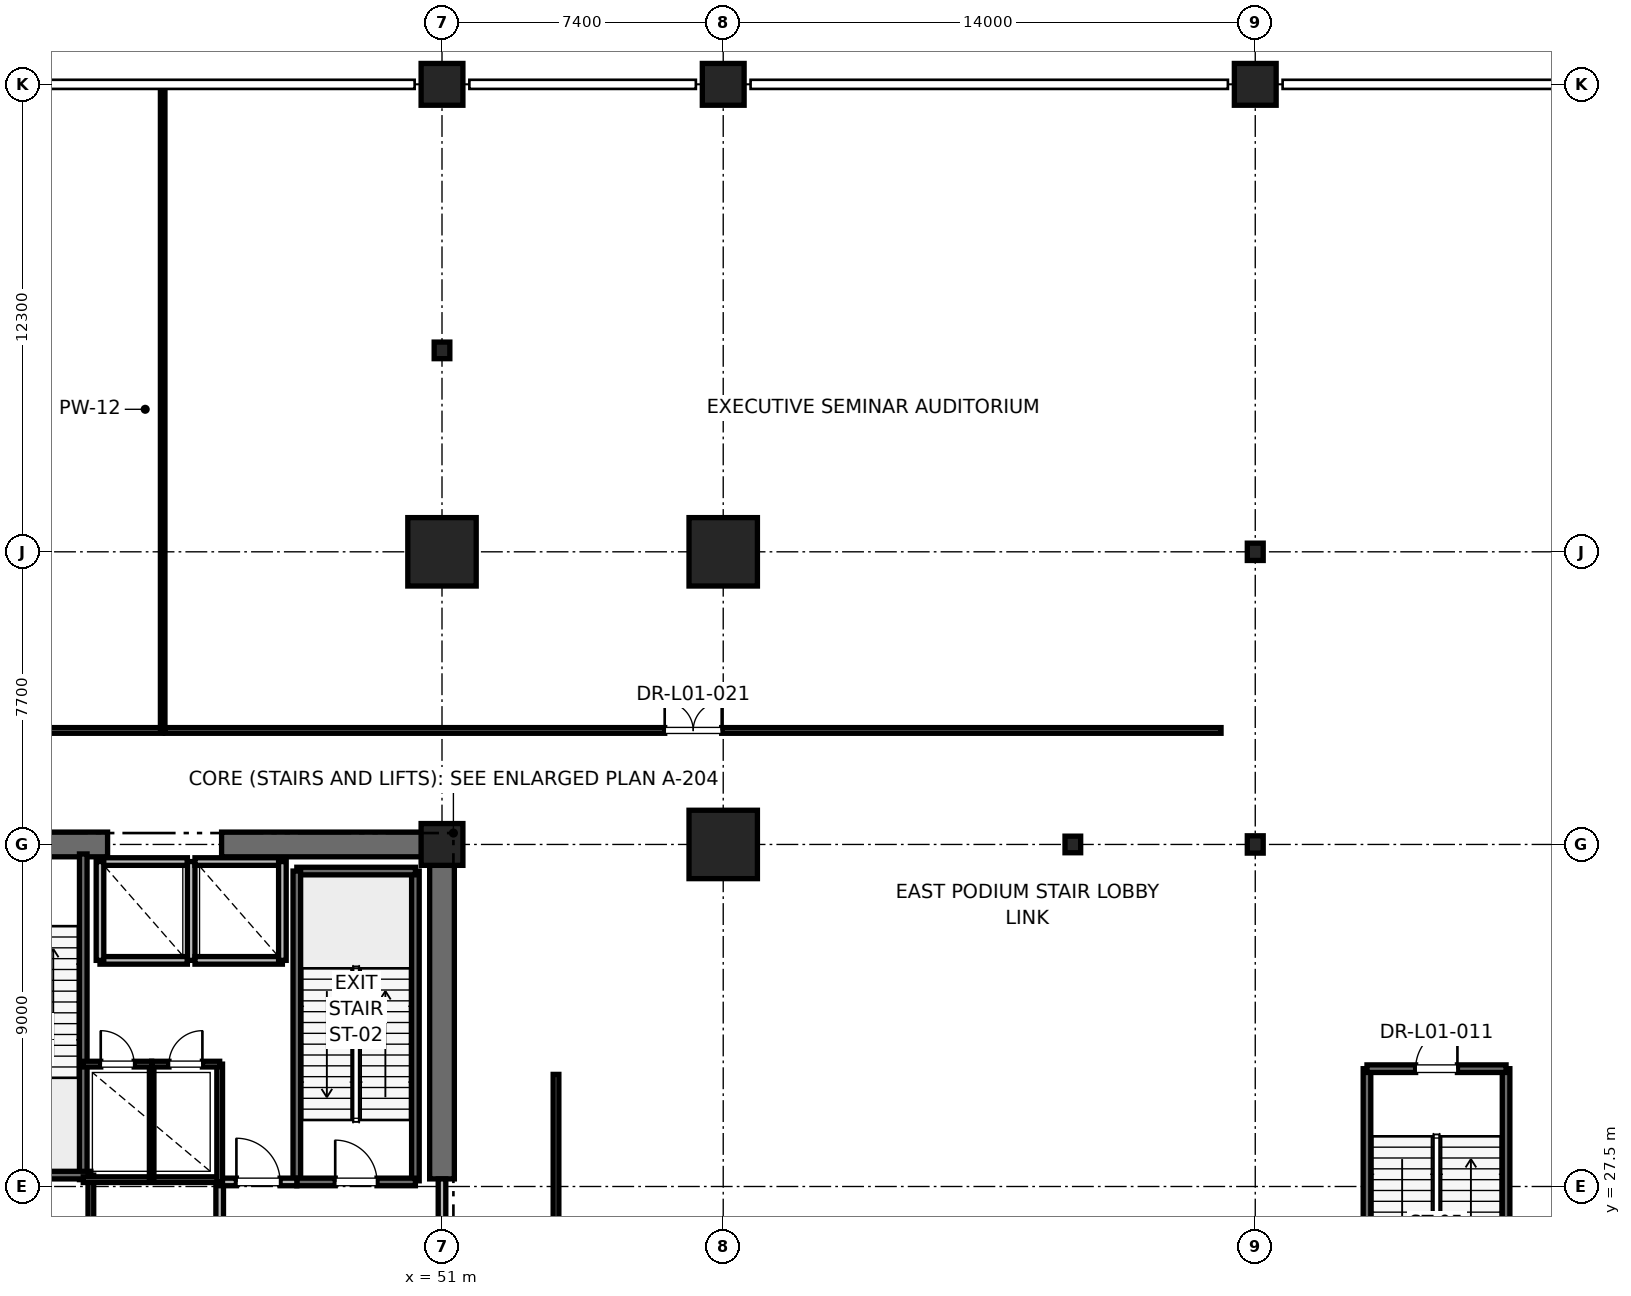
"""IFC4 building model, lengths in metres.
Left out: names, types, materials, properties, quantities, classifications, styles, units other than length and angle.
Written with IfcOpenShell. Run it as: python <this file> out.ifc"""

import sys

from ifc_helpers import new_model, si_unit, direction, frame, frame_2d, origin, origin_2d, place, context, subcontext, project, spatial, rectangle, i_section, extrude, element, fill, save


model = new_model("IFC4")
c1 = context("Model", 3, precision=1e-05, world=origin(), true_north=direction((0.0, 1.0)))
c2 = subcontext(c1, "Body", "Model", "MODEL_VIEW")
j1 = project(units=[si_unit("LENGTHUNIT", "METRE"), si_unit("PLANEANGLEUNIT", "RADIAN")], contexts=[c1])
p1 = place(None, origin())
s1 = spatial("IfcSite", under=j1, at=p1, CompositionType="ELEMENT")
p2 = place(p1, origin())
s2 = spatial("IfcBuilding", under=s1, at=p2, CompositionType="ELEMENT")
p3 = place(p2, frame((0.0, 0.0, 6.0)))
s3 = spatial("IfcBuildingStorey", under=s2, at=p3, CompositionType="ELEMENT", Elevation=6.0)
for number, where, z_axis, x_axis in (
    (1, (51.0, 44.2, 0.0), (0.0, 0.0, 1.0), (1.0, 0.0, 0.0)),
    (2, (58.4, 36.5, 0.0), (0.0, 0.0, 1.0), (1.0, 0.0, 0.0)),
    (3, (58.4, 44.2, 0.0), (0.0, 0.0, 1.0), (1.0, 0.0, 0.0)),
):
    element("IfcColumn", number, at=place(p3, frame(where, z_axis=z_axis, x_axis=x_axis)), inside=s3, PredefinedType="COLUMN", context=c2, shape_type="SweptSolid", body=[
        extrude(rectangle(XDim=1.8, YDim=1.8, at=origin_2d()), origin(), (0.0, 0.0, 1.0), 5.2),
    ])
for number, where, z_axis, x_axis in (
    (4, (67.6, 36.5, 0.0), (0.0, 0.0, 1.0), (1.0, 0.0, 0.0)),
    (5, (51.0, 49.5, 0.0), (0.0, 0.0, 1.0), (1.0, 0.0, 0.0)),
):
    element("IfcColumn", number, at=place(p3, frame(where, z_axis=z_axis, x_axis=x_axis)), inside=s3, PredefinedType="COLUMN", context=c2, shape_type="SweptSolid", body=[
        extrude(i_section(OverallWidth=0.412, OverallDepth=0.437, WebThickness=0.036, FlangeThickness=0.058, FilletRadius=0.015, at=origin_2d()), origin(), (0.0, 0.0, 1.0), 5.2),
    ])
p4 = place(p3, frame((51.0, 36.5, 0.0), z_axis=(0.0, 0.0, 1.0), x_axis=(1.0, 0.0, 0.0)))
e6 = element("IfcColumn", 6, at=p4, inside=s3, PredefinedType="PILASTER", context=c2, shape_type="SweptSolid", body=[
    extrude(rectangle(XDim=1.1, YDim=1.1, at=origin_2d()), origin(), (0.0, 0.0, 1.0), 5.2),
])
for number, where, z_axis, x_axis in (
    (7, (51.0, 56.5, 0.0), (0.0, 0.0, 1.0), (1.0, 0.0, 0.0)),
    (8, (58.4, 56.5, 0.0), (0.0, 0.0, 1.0), (1.0, 0.0, 0.0)),
    (9, (72.4, 56.5, 0.0), (0.0, 0.0, 1.0), (1.0, 0.0, 0.0)),
):
    element("IfcColumn", number, at=place(p3, frame(where, z_axis=z_axis, x_axis=x_axis)), inside=s3, PredefinedType="COLUMN", context=c2, shape_type="SweptSolid", body=[
        extrude(rectangle(XDim=1.1, YDim=1.1, at=origin_2d()), origin(), (0.0, 0.0, 1.0), 5.2),
    ])
for number, where, z_axis, x_axis in (
    (10, (72.4, 36.5, 0.0), (0.0, 0.0, 1.0), (1.0, 0.0, 0.0)),
    (11, (72.4, 44.2, 0.0), (0.0, 0.0, 1.0), (1.0, 0.0, 0.0)),
):
    element("IfcColumn", number, at=place(p3, frame(where, z_axis=z_axis, x_axis=x_axis)), inside=s3, PredefinedType="COLUMN", context=c2, shape_type="SweptSolid", body=[
        extrude(i_section(OverallWidth=0.418, OverallDepth=0.456, WebThickness=0.042, FlangeThickness=0.067, FilletRadius=0.015, at=origin_2d()), origin(), (0.0, 0.0, 1.0), 5.2),
    ])
p5 = place(p3, frame((37.8, 36.5, 0.0), z_axis=(0.0, 0.0, 1.0), x_axis=(1.0, 0.0, 0.0)))
e12 = element("IfcWall", 12, at=p5, inside=s3, PredefinedType="SHEAR", context=c2, shape_type="SweptSolid", body=[
    extrude(rectangle(XDim=4.4, YDim=0.65, at=frame_2d((2.2, 0.0))), origin(), (0.0, 0.0, 1.0), 4.92),
])
p6 = place(p5, frame((1.65, 0.0, 0.0)))
e13 = element("IfcOpeningElement", 13, at=p6, cuts=e12, PredefinedType="OPENING", context=c2, shape_type="SweptSolid", body=[
    extrude(rectangle(XDim=1.1, YDim=2.15, at=frame_2d((0.55, 1.075))), frame((0.0, 0.325, 0.0), z_axis=(0.0, -1.0, 0.0), x_axis=(1.0, 0.0, 0.0)), (0.0, 0.0, 1.0), 0.65),
])
p7 = place(p3, frame((45.2, 36.5, 0.0), z_axis=(0.0, 0.0, 1.0), x_axis=(1.0, 0.0, 0.0)))
e14 = element("IfcWall", 14, at=p7, inside=s3, PredefinedType="SHEAR", context=c2, shape_type="SweptSolid", body=[
    extrude(rectangle(XDim=5.8, YDim=0.65, at=frame_2d((2.9, 0.0))), origin(), (0.0, 0.0, 1.0), 4.92),
])
p8 = place(p3, frame((51.0, 27.7, 0.0), z_axis=(0.0, 0.0, 1.0), x_axis=(0.0, 1.0, 0.0)))
e15 = element("IfcWall", 15, at=p8, inside=s3, PredefinedType="SHEAR", context=c2, shape_type="SweptSolid", body=[
    extrude(rectangle(XDim=8.8, YDim=0.65, at=frame_2d((4.4, 0.0))), origin(), (0.0, 0.0, 1.0), 4.92),
])
p9 = place(p3, frame((50.3, 27.65, 0.0), z_axis=(0.0, 0.0, 1.0), x_axis=(0.0, 1.0, 0.0)))
e16 = element("IfcWall", 16, at=p9, inside=s3, PredefinedType="SOLIDWALL", context=c2, shape_type="SweptSolid", body=[
    extrude(rectangle(XDim=8.15, YDim=0.2, at=frame_2d((4.075, 0.0))), origin(), (0.0, 0.0, 1.0), 4.92),
])
p10 = place(p3, frame((47.18, 35.8, 0.0), z_axis=(0.0, 0.0, 1.0), x_axis=(1.0, 0.0, 0.0)))
e17 = element("IfcWall", 17, at=p10, inside=s3, PredefinedType="SOLIDWALL", context=c2, shape_type="SweptSolid", body=[
    extrude(rectangle(XDim=3.12, YDim=0.2, at=frame_2d((1.56, 0.0))), origin(), (0.0, 0.0, 1.0), 4.92),
])
p11 = place(p3, frame((47.18, 27.62, 0.0), z_axis=(0.0, 0.0, 1.0), x_axis=(0.0, 1.0, 0.0)))
e18 = element("IfcWall", 18, at=p11, inside=s3, PredefinedType="SOLIDWALL", context=c2, shape_type="SweptSolid", body=[
    extrude(rectangle(XDim=8.18, YDim=0.2, at=frame_2d((4.09, 0.0))), origin(), (0.0, 0.0, 1.0), 4.92),
])
p12 = place(p3, frame((47.18, 27.62, 0.0), z_axis=(0.0, 0.0, 1.0), x_axis=(1.0, 0.0, 0.0)))
e19 = element("IfcWall", 19, at=p12, inside=s3, PredefinedType="SOLIDWALL", context=c2, shape_type="SweptSolid", body=[
    extrude(rectangle(XDim=3.12, YDim=0.2, at=frame_2d((1.56, 0.0))), origin(), (0.0, 0.0, 1.0), 4.92),
])
p13 = place(p12, frame((1.01, 0.0, 0.0)))
e20 = element("IfcOpeningElement", 20, at=p13, cuts=e19, PredefinedType="OPENING", context=c2, shape_type="SweptSolid", body=[
    extrude(rectangle(XDim=1.1, YDim=2.15, at=frame_2d((0.55, 1.075))), frame((0.0, 0.1, 0.0), z_axis=(0.0, -1.0, 0.0), x_axis=(1.0, 0.0, 0.0)), (0.0, 0.0, 1.0), 0.2),
])
p14 = place(p3, frame((41.56, 27.68, 0.0), z_axis=(0.0, 0.0, 1.0), x_axis=(0.0, 1.0, 0.0)))
e21 = element("IfcWall", 21, at=p14, inside=s3, PredefinedType="SOLIDWALL", context=c2, shape_type="SweptSolid", body=[
    extrude(rectangle(XDim=8.57, YDim=0.2, at=frame_2d((4.285, 0.0))), origin(), (0.0, 0.0, 1.0), 4.92),
])
p15 = place(p3, frame((38.44, 27.8, 0.0), z_axis=(0.0, 0.0, 1.0), x_axis=(1.0, 0.0, 0.0)))
e22 = element("IfcWall", 22, at=p15, inside=s3, PredefinedType="SOLIDWALL", context=c2, shape_type="SweptSolid", body=[
    extrude(rectangle(XDim=3.32, YDim=0.2, at=frame_2d((1.66, 0.0))), origin(), (0.0, 0.0, 1.0), 4.92),
])
for number, where, z_axis, x_axis in (
    (23, (75.34, 21.9, 0.0), (0.0, 0.0, 1.0), (0.0, 1.0, 0.0)),
    (24, (79.0, 21.9, 0.0), (0.0, 0.0, 1.0), (0.0, 1.0, 0.0)),
):
    element("IfcWall", number, at=place(p3, frame(where, z_axis=z_axis, x_axis=x_axis)), inside=s3, PredefinedType="SOLIDWALL", context=c2, shape_type="SweptSolid", body=[
        extrude(rectangle(XDim=8.7, YDim=0.2, at=frame_2d((4.35, 0.0))), origin(), (0.0, 0.0, 1.0), 4.92),
    ])
p16 = place(p3, frame((75.34, 30.6, 0.0), z_axis=(0.0, 0.0, 1.0), x_axis=(1.0, 0.0, 0.0)))
e25 = element("IfcWall", 25, at=p16, inside=s3, PredefinedType="SOLIDWALL", context=c2, shape_type="SweptSolid", body=[
    extrude(rectangle(XDim=3.66, YDim=0.2, at=frame_2d((1.83, 0.0))), origin(), (0.0, 0.0, 1.0), 4.92),
])
p17 = place(p16, frame((1.28, 0.0, 0.0)))
e26 = element("IfcOpeningElement", 26, at=p17, cuts=e25, PredefinedType="OPENING", context=c2, shape_type="SweptSolid", body=[
    extrude(rectangle(XDim=1.1, YDim=2.15, at=frame_2d((0.55, 1.075))), frame((0.0, 0.1, 0.0), z_axis=(0.0, -1.0, 0.0), x_axis=(1.0, 0.0, 0.0)), (0.0, 0.0, 1.0), 0.2),
])
p18 = place(p3, frame((45.15, 24.25, 0.0), z_axis=(0.0, 0.0, 1.0), x_axis=(0.0, 1.0, 0.0)))
e27 = element("IfcWall", 27, at=p18, inside=s3, PredefinedType="PARTITIONING", context=c2, shape_type="SweptSolid", body=[
    extrude(rectangle(XDim=3.37, YDim=0.2, at=frame_2d((1.685, 0.0))), origin(), (0.0, 0.0, 1.0), 4.92),
])
p19 = place(p3, frame((45.15, 27.62, 0.0), z_axis=(0.0, 0.0, 1.0), x_axis=(1.0, 0.0, 0.0)))
e28 = element("IfcWall", 28, at=p19, inside=s3, PredefinedType="PARTITIONING", context=c2, shape_type="SweptSolid", body=[
    extrude(rectangle(XDim=2.03, YDim=0.2, at=frame_2d((1.015, 0.0))), origin(), (0.0, 0.0, 1.0), 4.92),
])
p20 = place(p19, frame((0.44, 0.0, 0.0)))
e29 = element("IfcOpeningElement", 29, at=p20, cuts=e28, PredefinedType="OPENING", context=c2, shape_type="SweptSolid", body=[
    extrude(rectangle(XDim=1.15, YDim=2.2, at=frame_2d((0.575, 1.1))), frame((0.0, 0.1, 0.0), z_axis=(0.0, -1.0, 0.0), x_axis=(1.0, 0.0, 0.0)), (0.0, 0.0, 1.0), 0.2),
])
p21 = place(p3, frame((51.0, 24.3, 0.0), z_axis=(0.0, 0.0, 1.0), x_axis=(0.0, 1.0, 0.0)))
e30 = element("IfcWall", 30, at=p21, inside=s3, PredefinedType="PARTITIONING", context=c2, shape_type="SweptSolid", body=[
    extrude(rectangle(XDim=3.4, YDim=0.2, at=frame_2d((1.7, 0.0))), origin(), (0.0, 0.0, 1.0), 3.7),
])
p22 = place(p21, frame((1.125, 0.0, 0.0)))
e31 = element("IfcOpeningElement", 31, at=p22, cuts=e30, PredefinedType="OPENING", context=c2, shape_type="SweptSolid", body=[
    extrude(rectangle(XDim=1.15, YDim=2.2, at=frame_2d((0.575, 1.1))), frame((0.0, 0.1, 0.0), z_axis=(0.0, -1.0, 0.0), x_axis=(1.0, 0.0, 0.0)), (0.0, 0.0, 1.0), 0.2),
])
p23 = place(p3, frame((42.0, 33.45, 0.0), z_axis=(0.0, 0.0, 1.0), x_axis=(1.0, 0.0, 0.0)))
e32 = element("IfcWall", 32, at=p23, inside=s3, PredefinedType="SOLIDWALL", context=c2, shape_type="SweptSolid", body=[
    extrude(rectangle(XDim=2.3, YDim=0.2, at=frame_2d((1.15, 0.0))), origin(), (0.0, 0.0, 1.0), 4.92),
])
p24 = place(p3, frame((44.3, 36.05, 0.0), z_axis=(0.0, 0.0, 1.0), x_axis=(-1.0, 0.0, 0.0)))
e33 = element("IfcWall", 33, at=p24, inside=s3, PredefinedType="SOLIDWALL", context=c2, shape_type="SweptSolid", body=[
    extrude(rectangle(XDim=2.3, YDim=0.2, at=frame_2d((1.15, 0.0))), origin(), (0.0, 0.0, 1.0), 3.7),
])
for number, where, z_axis, x_axis in (
    (34, (42.0, 36.05, 0.0), (0.0, 0.0, 1.0), (0.0, -1.0, 0.0)),
    (35, (44.4, 33.45, 0.0), (0.0, 0.0, 1.0), (0.0, 1.0, 0.0)),
):
    element("IfcWall", number, at=place(p3, frame(where, z_axis=z_axis, x_axis=x_axis)), inside=s3, PredefinedType="SOLIDWALL", context=c2, shape_type="SweptSolid", body=[
        extrude(rectangle(XDim=2.6, YDim=0.2, at=frame_2d((1.3, 0.0))), origin(), (0.0, 0.0, 1.0), 3.7),
    ])
p25 = place(p3, frame((44.5, 33.45, 0.0), z_axis=(0.0, 0.0, 1.0), x_axis=(1.0, 0.0, 0.0)))
e36 = element("IfcWall", 36, at=p25, inside=s3, PredefinedType="SOLIDWALL", context=c2, shape_type="SweptSolid", body=[
    extrude(rectangle(XDim=2.3, YDim=0.2, at=frame_2d((1.15, 0.0))), origin(), (0.0, 0.0, 1.0), 4.92),
])
p26 = place(p3, frame((46.8, 36.05, 0.0), z_axis=(0.0, 0.0, 1.0), x_axis=(-1.0, 0.0, 0.0)))
e37 = element("IfcWall", 37, at=p26, inside=s3, PredefinedType="SOLIDWALL", context=c2, shape_type="SweptSolid", body=[
    extrude(rectangle(XDim=2.3, YDim=0.2, at=frame_2d((1.15, 0.0))), origin(), (0.0, 0.0, 1.0), 3.7),
])
p27 = place(p3, frame((46.8, 33.45, 0.0), z_axis=(0.0, 0.0, 1.0), x_axis=(0.0, 1.0, 0.0)))
e38 = element("IfcWall", 38, at=p27, inside=s3, PredefinedType="SOLIDWALL", context=c2, shape_type="SweptSolid", body=[
    extrude(rectangle(XDim=2.6, YDim=0.2, at=frame_2d((1.3, 0.0))), origin(), (0.0, 0.0, 1.0), 4.92),
])
p28 = place(p3, frame((41.76, 23.8, 0.0), z_axis=(0.0, 0.0, 1.0), x_axis=(0.0, 1.0, 0.0)))
e39 = element("IfcWall", 39, at=p28, inside=s3, PredefinedType="PARTITIONING", context=c2, shape_type="SweptSolid", body=[
    extrude(rectangle(XDim=4.0, YDim=0.15, at=frame_2d((2.0, 0.0))), origin(), (0.0, 0.0, 1.0), 2.85),
])
p29 = place(p3, frame((41.56, 27.68, 0.0), z_axis=(0.0, 0.0, 1.0), x_axis=(1.0, 0.0, 0.0)))
e40 = element("IfcWall", 40, at=p29, inside=s3, PredefinedType="PARTITIONING", context=c2, shape_type="SweptSolid", body=[
    extrude(rectangle(XDim=3.59, YDim=0.15, at=frame_2d((1.795, 0.0))), origin(), (0.0, 0.0, 1.0), 2.85),
])
p30 = place(p3, frame((45.15, 27.62, 0.0), z_axis=(0.0, 0.0, 1.0), x_axis=(0.0, 1.0, 0.0)))
e41 = element("IfcWall", 41, at=p30, inside=s3, PredefinedType="PARTITIONING", context=c2, shape_type="SweptSolid", body=[
    extrude(rectangle(XDim=3.1, YDim=0.15, at=frame_2d((1.55, 0.0))), origin(), (0.0, 0.0, 1.0), 2.85),
])
p31 = place(p3, frame((43.36, 27.68, 0.0), z_axis=(0.0, 0.0, 1.0), x_axis=(0.0, 1.0, 0.0)))
e42 = element("IfcWall", 42, at=p31, inside=s3, PredefinedType="PARTITIONING", context=c2, shape_type="SweptSolid", body=[
    extrude(rectangle(XDim=3.04, YDim=0.12, at=frame_2d((1.52, 0.0))), origin(), (0.0, 0.0, 1.0), 2.85),
])
p32 = place(p3, frame((41.56, 30.72, 0.0), z_axis=(0.0, 0.0, 1.0), x_axis=(1.0, 0.0, 0.0)))
e43 = element("IfcWall", 43, at=p32, inside=s3, PredefinedType="PARTITIONING", context=c2, shape_type="SweptSolid", body=[
    extrude(rectangle(XDim=1.8, YDim=0.15, at=frame_2d((0.9, 0.0))), origin(), (0.0, 0.0, 1.0), 2.85),
])
p33 = place(p32, frame((0.46, 0.0, 0.0)))
e44 = element("IfcOpeningElement", 44, at=p33, cuts=e43, PredefinedType="OPENING", context=c2, shape_type="SweptSolid", body=[
    extrude(rectangle(XDim=0.88, YDim=2.1, at=frame_2d((0.44, 1.05))), frame((0.0, 0.075, 0.0), z_axis=(0.0, -1.0, 0.0), x_axis=(1.0, 0.0, 0.0)), (0.0, 0.0, 1.0), 0.15),
])
p34 = place(p3, frame((43.36, 30.72, 0.0), z_axis=(0.0, 0.0, 1.0), x_axis=(1.0, 0.0, 0.0)))
e45 = element("IfcWall", 45, at=p34, inside=s3, PredefinedType="PARTITIONING", context=c2, shape_type="SweptSolid", body=[
    extrude(rectangle(XDim=1.79, YDim=0.15, at=frame_2d((0.895, 0.0))), origin(), (0.0, 0.0, 1.0), 2.85),
])
p35 = place(p34, frame((0.455, 0.0, 0.0)))
e46 = element("IfcOpeningElement", 46, at=p35, cuts=e45, PredefinedType="OPENING", context=c2, shape_type="SweptSolid", body=[
    extrude(rectangle(XDim=0.88, YDim=2.1, at=frame_2d((0.44, 1.05))), frame((0.0, 0.075, 0.0), z_axis=(0.0, -1.0, 0.0), x_axis=(1.0, 0.0, 0.0)), (0.0, 0.0, 1.0), 0.15),
])
p36 = place(p3, frame((9.5, 39.5, 0.0), z_axis=(0.0, 0.0, 1.0), x_axis=(1.0, 0.0, 0.0)))
e47 = element("IfcWall", 47, at=p36, inside=s3, PredefinedType="PARTITIONING", context=c2, shape_type="SweptSolid", body=[
    extrude(rectangle(XDim=34.15, YDim=0.15, at=frame_2d((17.075, 0.0))), origin(), (0.0, 0.0, 1.0), 2.85),
])
p37 = place(p36, frame((16.54, 0.0, 0.0)))
e48 = element("IfcOpeningElement", 48, at=p37, cuts=e47, PredefinedType="OPENING", context=c2, shape_type="SweptSolid", body=[
    extrude(rectangle(XDim=1.0, YDim=2.15, at=frame_2d((0.5, 1.075))), frame((0.0, 0.075, 0.0), z_axis=(0.0, -1.0, 0.0), x_axis=(1.0, 0.0, 0.0)), (0.0, 0.0, 1.0), 0.15),
])
p38 = place(p3, frame((43.65, 39.5, 0.0), z_axis=(0.0, 0.0, 1.0), x_axis=(0.0, 1.0, 0.0)))
e49 = element("IfcWall", 49, at=p38, inside=s3, PredefinedType="PARTITIONING", context=c2, shape_type="SweptSolid", body=[
    extrude(rectangle(XDim=16.9, YDim=0.12, at=frame_2d((8.45, 0.0))), origin(), (0.0, 0.0, 1.0), 2.85),
])
p39 = place(p3, frame((43.72, 39.5, 0.0), z_axis=(0.0, 0.0, 1.0), x_axis=(1.0, 0.0, 0.0)))
e50 = element("IfcWall", 50, at=p39, inside=s3, PredefinedType="PARTITIONING", context=c2, shape_type="SweptSolid", body=[
    extrude(rectangle(XDim=27.78, YDim=0.15, at=frame_2d((13.89, 0.0))), origin(), (0.0, 0.0, 1.0), 2.85),
])
p40 = place(p39, frame((13.14, 0.0, 0.0)))
e51 = element("IfcOpeningElement", 51, at=p40, cuts=e50, PredefinedType="OPENING", context=c2, shape_type="SweptSolid", body=[
    extrude(rectangle(XDim=1.5, YDim=2.25, at=frame_2d((0.75, 1.125))), frame((0.0, 0.075, 0.0), z_axis=(0.0, -1.0, 0.0), x_axis=(1.0, 0.0, 0.0)), (0.0, 0.0, 1.0), 0.15),
])
p41 = place(p3, frame((54.0, 16.0, 0.0), z_axis=(0.0, 0.0, 1.0), x_axis=(0.0, 1.0, 0.0)))
e52 = element("IfcWall", 52, at=p41, inside=s3, PredefinedType="PARTITIONING", context=c2, shape_type="SweptSolid", body=[
    extrude(rectangle(XDim=14.45, YDim=0.15, at=frame_2d((7.225, 0.0))), origin(), (0.0, 0.0, 1.0), 2.85),
])
p42 = place(p41, frame((8.025, 0.0, 0.0)))
e53 = element("IfcOpeningElement", 53, at=p42, cuts=e52, PredefinedType="OPENING", context=c2, shape_type="SweptSolid", body=[
    extrude(rectangle(XDim=1.0, YDim=2.15, at=frame_2d((0.5, 1.075))), frame((0.0, 0.075, 0.0), z_axis=(0.0, -1.0, 0.0), x_axis=(1.0, 0.0, 0.0)), (0.0, 0.0, 1.0), 0.15),
])
p43 = place(p13, origin())
e54 = element("IfcDoor", 54, at=p43, inside=s3, OperationType="SINGLE_SWING_LEFT", PredefinedType="DOOR", context=c2, shape_type="SweptSolid", body=[
    extrude(rectangle(XDim=1.1, YDim=2.15, at=frame_2d((0.55, 1.075))), frame((0.0, 0.025, 0.0), z_axis=(0.0, -1.0, 0.0), x_axis=(1.0, 0.0, 0.0)), (0.0, 0.0, 1.0), 0.05),
])
fill(e20, e54)
p44 = place(p17, origin())
e55 = element("IfcDoor", 55, at=p44, inside=s3, OperationType="SINGLE_SWING_RIGHT", PredefinedType="DOOR", context=c2, shape_type="SweptSolid", body=[
    extrude(rectangle(XDim=1.1, YDim=2.15, at=frame_2d((0.55, 1.075))), frame((0.0, 0.025, 0.0), z_axis=(0.0, -1.0, 0.0), x_axis=(1.0, 0.0, 0.0)), (0.0, 0.0, 1.0), 0.05),
])
fill(e26, e55)
p45 = place(p20, origin())
e56 = element("IfcDoor", 56, at=p45, inside=s3, OperationType="SINGLE_SWING_LEFT", PredefinedType="DOOR", context=c2, shape_type="SweptSolid", body=[
    extrude(rectangle(XDim=1.15, YDim=2.2, at=frame_2d((0.575, 1.1))), frame((0.0, 0.025, 0.0), z_axis=(0.0, -1.0, 0.0), x_axis=(1.0, 0.0, 0.0)), (0.0, 0.0, 1.0), 0.05),
])
fill(e29, e56)
p46 = place(p33, origin())
e57 = element("IfcDoor", 57, at=p46, inside=s3, OperationType="SINGLE_SWING_LEFT", PredefinedType="DOOR", context=c2, shape_type="SweptSolid", body=[
    extrude(rectangle(XDim=0.88, YDim=2.1, at=frame_2d((0.44, 1.05))), frame((0.0, 0.025, 0.0), z_axis=(0.0, -1.0, 0.0), x_axis=(1.0, 0.0, 0.0)), (0.0, 0.0, 1.0), 0.05),
])
fill(e44, e57)
p47 = place(p35, origin())
e58 = element("IfcDoor", 58, at=p47, inside=s3, OperationType="SINGLE_SWING_RIGHT", PredefinedType="DOOR", context=c2, shape_type="SweptSolid", body=[
    extrude(rectangle(XDim=0.88, YDim=2.1, at=frame_2d((0.44, 1.05))), frame((0.0, 0.025, 0.0), z_axis=(0.0, -1.0, 0.0), x_axis=(1.0, 0.0, 0.0)), (0.0, 0.0, 1.0), 0.05),
])
fill(e46, e58)
p48 = place(p40, origin())
e59 = element("IfcDoor", 59, at=p48, inside=s3, OperationType="DOUBLE_DOOR_SINGLE_SWING", PredefinedType="DOOR", context=c2, shape_type="SweptSolid", body=[
    extrude(rectangle(XDim=1.5, YDim=2.25, at=frame_2d((0.75, 1.125))), frame((0.0, 0.025, 0.0), z_axis=(0.0, -1.0, 0.0), x_axis=(1.0, 0.0, 0.0)), (0.0, 0.0, 1.0), 0.05),
])
fill(e51, e59)
save(model, sys.argv[1])
